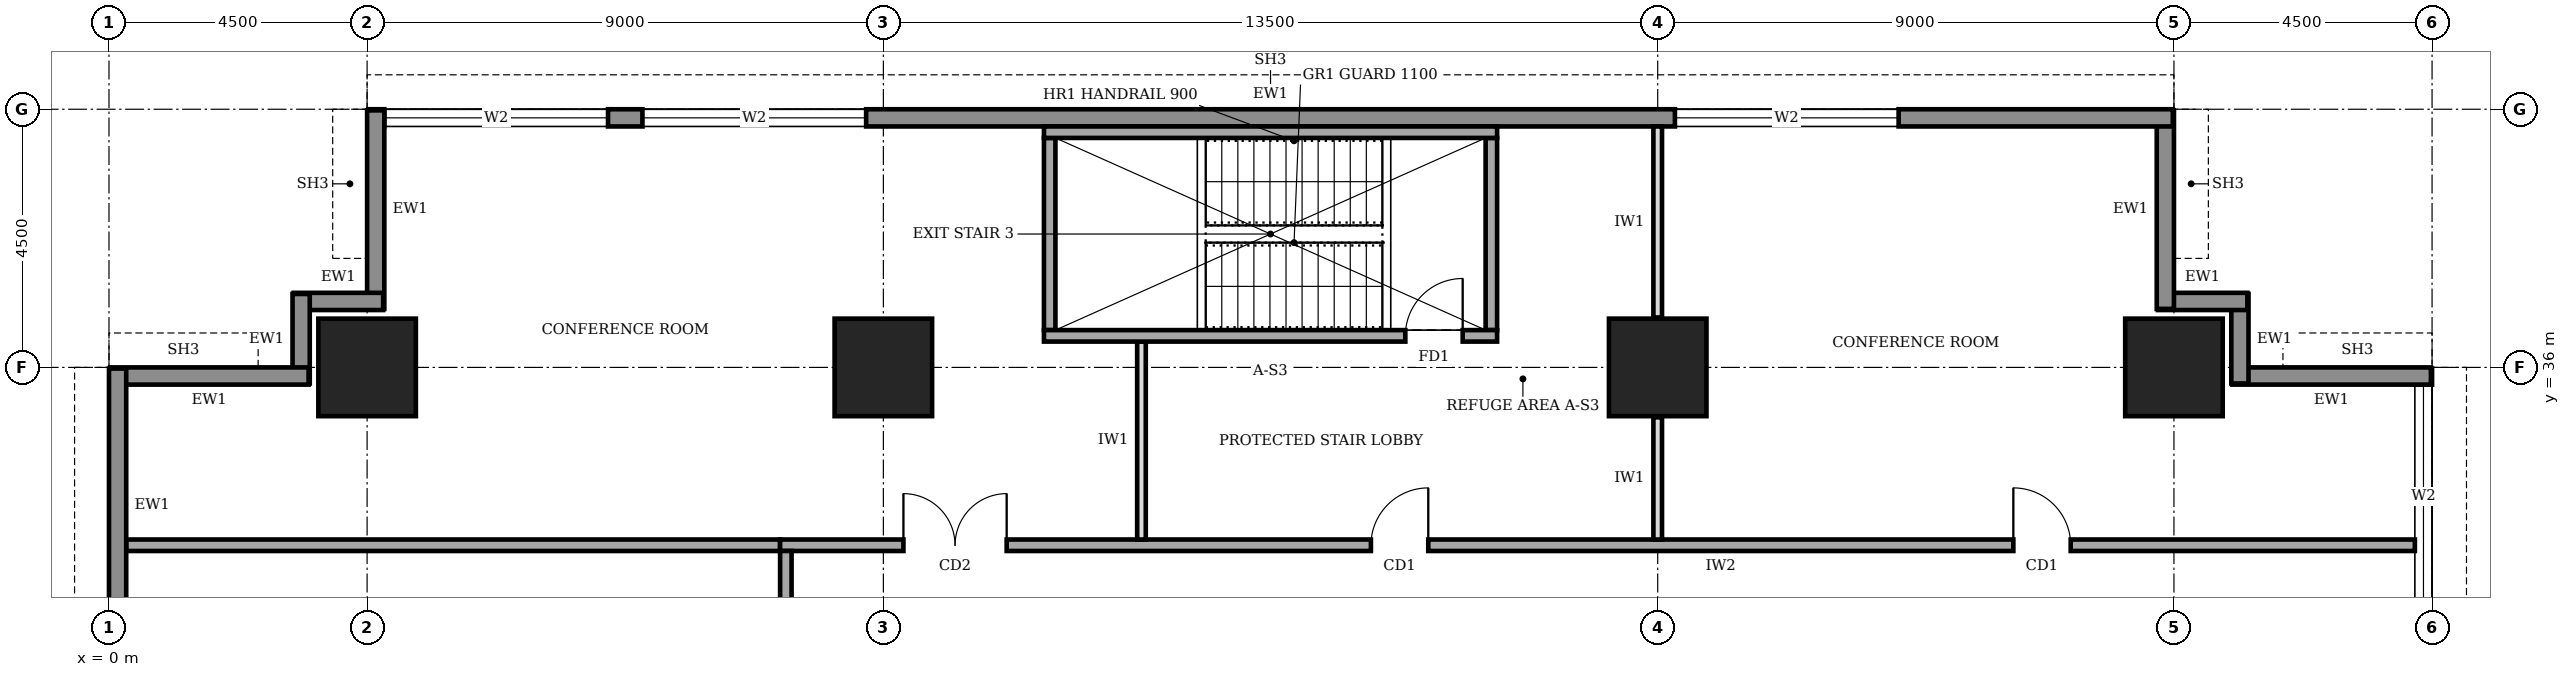
"""IFC4 building model, lengths in metres.
Left out: names, types, materials, properties, quantities, classifications, styles, units other than length and angle.
Written with IfcOpenShell. Run it as: python <this file> out.ifc"""

import sys

from ifc_helpers import new_model, si_unit, direction, frame, frame_2d, origin, origin_2d, place, context, subcontext, project, spatial, rectangle, extrude, element, fill, save


model = new_model("IFC4")
c1 = context("Model", 3, precision=1e-05, world=origin(), true_north=direction((0.0, 1.0)))
c2 = subcontext(c1, "Body", "Model", "MODEL_VIEW")
j1 = project(units=[si_unit("LENGTHUNIT", "METRE"), si_unit("PLANEANGLEUNIT", "RADIAN")], contexts=[c1])
p1 = place(None, origin())
s1 = spatial("IfcSite", under=j1, at=p1, CompositionType="ELEMENT")
p2 = place(p1, origin())
s2 = spatial("IfcBuilding", under=s1, at=p2, CompositionType="ELEMENT")
p3 = place(p2, frame((0.0, 0.0, 153.0)))
s3 = spatial("IfcBuildingStorey", under=s2, at=p3, CompositionType="ELEMENT", Elevation=153.0)
for number, where, z_axis, x_axis in (
    (1, (4.5, 36.0, 0.0), (0.0, 0.0, 1.0), (1.0, 0.0, 0.0)),
    (2, (13.5, 36.0, 0.0), (0.0, 0.0, 1.0), (1.0, 0.0, 0.0)),
    (3, (27.0, 36.0, 0.0), (0.0, 0.0, 1.0), (1.0, 0.0, 0.0)),
    (4, (36.0, 36.0, 0.0), (0.0, 0.0, 1.0), (1.0, 0.0, 0.0)),
):
    element("IfcColumn", number, at=place(p3, frame(where, z_axis=z_axis, x_axis=x_axis)), inside=s3, PredefinedType="COLUMN", context=c2, shape_type="SweptSolid", body=[
        extrude(rectangle(XDim=1.7, YDim=1.7, at=origin_2d()), origin(), (0.0, 0.0, 1.0), 4.0),
    ])
p4 = place(p3, frame((40.35, 4.52, 0.0), z_axis=(0.0, 0.0, 1.0), x_axis=(0.0, 1.0, 0.0)))
e5 = element("IfcWall", 5, at=p4, inside=s3, PredefinedType="STANDARD", context=c2, shape_type="SweptSolid", body=[
    extrude(rectangle(XDim=31.46, YDim=0.3, at=frame_2d((15.73, 0.0))), origin(), (0.0, 0.0, 1.0), 3.75),
])
p5 = place(p4, frame((4.78, 0.0, 0.6)))
e6 = element("IfcOpeningElement", 6, at=p5, cuts=e5, PredefinedType="OPENING", context=c2, shape_type="SweptSolid", body=[
    extrude(rectangle(XDim=3.9, YDim=2.6, at=frame_2d((1.95, 1.3))), frame((0.0, 0.16, 0.0), z_axis=(0.0, -1.0, 0.0), x_axis=(1.0, 0.0, 0.0)), (0.0, 0.0, 1.0), 0.32),
])
p6 = place(p4, frame((9.28, 0.0, 0.6)))
e7 = element("IfcOpeningElement", 7, at=p6, cuts=e5, PredefinedType="OPENING", context=c2, shape_type="SweptSolid", body=[
    extrude(rectangle(XDim=3.9, YDim=2.6, at=frame_2d((1.95, 1.3))), frame((0.0, 0.16, 0.0), z_axis=(0.0, -1.0, 0.0), x_axis=(1.0, 0.0, 0.0)), (0.0, 0.0, 1.0), 0.32),
])
p7 = place(p4, frame((13.78, 0.0, 0.6)))
e8 = element("IfcOpeningElement", 8, at=p7, cuts=e5, PredefinedType="OPENING", context=c2, shape_type="SweptSolid", body=[
    extrude(rectangle(XDim=3.9, YDim=2.6, at=frame_2d((1.95, 1.3))), frame((0.0, 0.16, 0.0), z_axis=(0.0, -1.0, 0.0), x_axis=(1.0, 0.0, 0.0)), (0.0, 0.0, 1.0), 0.32),
])
p8 = place(p4, frame((18.28, 0.0, 0.6)))
e9 = element("IfcOpeningElement", 9, at=p8, cuts=e5, PredefinedType="OPENING", context=c2, shape_type="SweptSolid", body=[
    extrude(rectangle(XDim=3.9, YDim=2.6, at=frame_2d((1.95, 1.3))), frame((0.0, 0.16, 0.0), z_axis=(0.0, -1.0, 0.0), x_axis=(1.0, 0.0, 0.0)), (0.0, 0.0, 1.0), 0.32),
])
p9 = place(p4, frame((22.78, 0.0, 0.6)))
e10 = element("IfcOpeningElement", 10, at=p9, cuts=e5, PredefinedType="OPENING", context=c2, shape_type="SweptSolid", body=[
    extrude(rectangle(XDim=3.9, YDim=2.6, at=frame_2d((1.95, 1.3))), frame((0.0, 0.16, 0.0), z_axis=(0.0, -1.0, 0.0), x_axis=(1.0, 0.0, 0.0)), (0.0, 0.0, 1.0), 0.32),
])
p10 = place(p4, frame((27.28, 0.0, 0.6)))
e11 = element("IfcOpeningElement", 11, at=p10, cuts=e5, PredefinedType="OPENING", context=c2, shape_type="SweptSolid", body=[
    extrude(rectangle(XDim=3.9, YDim=2.6, at=frame_2d((1.95, 1.3))), frame((0.0, 0.16, 0.0), z_axis=(0.0, -1.0, 0.0), x_axis=(1.0, 0.0, 0.0)), (0.0, 0.0, 1.0), 0.32),
])
p11 = place(p3, frame((40.48, 35.85, 0.0), z_axis=(0.0, 0.0, 1.0), x_axis=(-1.0, 0.0, 0.0)))
e12 = element("IfcWall", 12, at=p11, inside=s3, PredefinedType="STANDARD", context=c2, shape_type="SweptSolid", body=[
    extrude(rectangle(XDim=3.46, YDim=0.3, at=frame_2d((1.73, 0.0))), origin(), (0.0, 0.0, 1.0), 2.85),
])
for number, where, z_axis, x_axis in (
    (13, (37.15, 35.72, 0.0), (0.0, 0.0, 1.0), (0.0, 1.0, 0.0)),
    (14, (37.28, 37.15, 0.0), (0.0, 0.0, 1.0), (-1.0, 0.0, 0.0)),
):
    element("IfcWall", number, at=place(p3, frame(where, z_axis=z_axis, x_axis=x_axis)), inside=s3, PredefinedType="STANDARD", context=c2, shape_type="SweptSolid", body=[
        extrude(rectangle(XDim=1.56, YDim=0.3, at=frame_2d((0.78, 0.0))), origin(), (0.0, 0.0, 1.0), 3.75),
    ])
p12 = place(p3, frame((35.85, 37.02, 0.0), z_axis=(0.0, 0.0, 1.0), x_axis=(0.0, 1.0, 0.0)))
e15 = element("IfcWall", 15, at=p12, inside=s3, PredefinedType="STANDARD", context=c2, shape_type="SweptSolid", body=[
    extrude(rectangle(XDim=3.46, YDim=0.3, at=frame_2d((1.73, 0.0))), origin(), (0.0, 0.0, 1.0), 2.85),
])
p13 = place(p3, frame((35.98, 40.35, 0.0), z_axis=(0.0, 0.0, 1.0), x_axis=(-1.0, 0.0, 0.0)))
e16 = element("IfcWall", 16, at=p13, inside=s3, PredefinedType="STANDARD", context=c2, shape_type="SweptSolid", body=[
    extrude(rectangle(XDim=31.46, YDim=0.3, at=frame_2d((15.73, 0.0))), origin(), (0.0, 0.0, 1.0), 3.75),
])
p14 = place(p13, frame((27.28, 0.0, 0.6)))
e17 = element("IfcOpeningElement", 17, at=p14, cuts=e16, PredefinedType="OPENING", context=c2, shape_type="SweptSolid", body=[
    extrude(rectangle(XDim=3.9, YDim=2.6, at=frame_2d((1.95, 1.3))), frame((0.0, 0.16, 0.0), z_axis=(0.0, -1.0, 0.0), x_axis=(1.0, 0.0, 0.0)), (0.0, 0.0, 1.0), 0.32),
])
p15 = place(p13, frame((22.78, 0.0, 0.6)))
e18 = element("IfcOpeningElement", 18, at=p15, cuts=e16, PredefinedType="OPENING", context=c2, shape_type="SweptSolid", body=[
    extrude(rectangle(XDim=3.9, YDim=2.6, at=frame_2d((1.95, 1.3))), frame((0.0, 0.16, 0.0), z_axis=(0.0, -1.0, 0.0), x_axis=(1.0, 0.0, 0.0)), (0.0, 0.0, 1.0), 0.32),
])
p16 = place(p13, frame((4.78, 0.0, 0.6)))
e19 = element("IfcOpeningElement", 19, at=p16, cuts=e16, PredefinedType="OPENING", context=c2, shape_type="SweptSolid", body=[
    extrude(rectangle(XDim=3.9, YDim=2.6, at=frame_2d((1.95, 1.3))), frame((0.0, 0.16, 0.0), z_axis=(0.0, -1.0, 0.0), x_axis=(1.0, 0.0, 0.0)), (0.0, 0.0, 1.0), 0.32),
])
p17 = place(p3, frame((4.65, 40.48, 0.0), z_axis=(0.0, 0.0, 1.0), x_axis=(0.0, -1.0, 0.0)))
e20 = element("IfcWall", 20, at=p17, inside=s3, PredefinedType="STANDARD", context=c2, shape_type="SweptSolid", body=[
    extrude(rectangle(XDim=3.46, YDim=0.3, at=frame_2d((1.73, 0.0))), origin(), (0.0, 0.0, 1.0), 2.85),
])
for number, where, z_axis, x_axis in (
    (21, (4.78, 37.15, 0.0), (0.0, 0.0, 1.0), (-1.0, 0.0, 0.0)),
    (22, (3.35, 37.28, 0.0), (0.0, 0.0, 1.0), (0.0, -1.0, 0.0)),
):
    element("IfcWall", number, at=place(p3, frame(where, z_axis=z_axis, x_axis=x_axis)), inside=s3, PredefinedType="STANDARD", context=c2, shape_type="SweptSolid", body=[
        extrude(rectangle(XDim=1.56, YDim=0.3, at=frame_2d((0.78, 0.0))), origin(), (0.0, 0.0, 1.0), 3.75),
    ])
p18 = place(p3, frame((3.48, 35.85, 0.0), z_axis=(0.0, 0.0, 1.0), x_axis=(-1.0, 0.0, 0.0)))
e23 = element("IfcWall", 23, at=p18, inside=s3, PredefinedType="STANDARD", context=c2, shape_type="SweptSolid", body=[
    extrude(rectangle(XDim=3.46, YDim=0.3, at=frame_2d((1.73, 0.0))), origin(), (0.0, 0.0, 1.0), 2.85),
])
p19 = place(p3, frame((0.15, 35.98, 0.0), z_axis=(0.0, 0.0, 1.0), x_axis=(0.0, -1.0, 0.0)))
e24 = element("IfcWall", 24, at=p19, inside=s3, PredefinedType="STANDARD", context=c2, shape_type="SweptSolid", body=[
    extrude(rectangle(XDim=31.46, YDim=0.3, at=frame_2d((15.73, 0.0))), origin(), (0.0, 0.0, 1.0), 3.75),
])
p20 = place(p19, frame((27.28, 0.0, 0.6)))
e25 = element("IfcOpeningElement", 25, at=p20, cuts=e24, PredefinedType="OPENING", context=c2, shape_type="SweptSolid", body=[
    extrude(rectangle(XDim=3.9, YDim=2.6, at=frame_2d((1.95, 1.3))), frame((0.0, 0.16, 0.0), z_axis=(0.0, -1.0, 0.0), x_axis=(1.0, 0.0, 0.0)), (0.0, 0.0, 1.0), 0.32),
])
p21 = place(p19, frame((22.78, 0.0, 0.6)))
e26 = element("IfcOpeningElement", 26, at=p21, cuts=e24, PredefinedType="OPENING", context=c2, shape_type="SweptSolid", body=[
    extrude(rectangle(XDim=3.9, YDim=2.6, at=frame_2d((1.95, 1.3))), frame((0.0, 0.16, 0.0), z_axis=(0.0, -1.0, 0.0), x_axis=(1.0, 0.0, 0.0)), (0.0, 0.0, 1.0), 0.32),
])
p22 = place(p19, frame((18.28, 0.0, 0.6)))
e27 = element("IfcOpeningElement", 27, at=p22, cuts=e24, PredefinedType="OPENING", context=c2, shape_type="SweptSolid", body=[
    extrude(rectangle(XDim=3.9, YDim=2.6, at=frame_2d((1.95, 1.3))), frame((0.0, 0.16, 0.0), z_axis=(0.0, -1.0, 0.0), x_axis=(1.0, 0.0, 0.0)), (0.0, 0.0, 1.0), 0.32),
])
p23 = place(p19, frame((13.78, 0.0, 0.6)))
e28 = element("IfcOpeningElement", 28, at=p23, cuts=e24, PredefinedType="OPENING", context=c2, shape_type="SweptSolid", body=[
    extrude(rectangle(XDim=3.9, YDim=2.6, at=frame_2d((1.95, 1.3))), frame((0.0, 0.16, 0.0), z_axis=(0.0, -1.0, 0.0), x_axis=(1.0, 0.0, 0.0)), (0.0, 0.0, 1.0), 0.32),
])
p24 = place(p19, frame((9.28, 0.0, 0.6)))
e29 = element("IfcOpeningElement", 29, at=p24, cuts=e24, PredefinedType="OPENING", context=c2, shape_type="SweptSolid", body=[
    extrude(rectangle(XDim=3.9, YDim=2.6, at=frame_2d((1.95, 1.3))), frame((0.0, 0.16, 0.0), z_axis=(0.0, -1.0, 0.0), x_axis=(1.0, 0.0, 0.0)), (0.0, 0.0, 1.0), 0.32),
])
p25 = place(p19, frame((4.78, 0.0, 0.6)))
e30 = element("IfcOpeningElement", 30, at=p25, cuts=e24, PredefinedType="OPENING", context=c2, shape_type="SweptSolid", body=[
    extrude(rectangle(XDim=3.9, YDim=2.6, at=frame_2d((1.95, 1.3))), frame((0.0, 0.16, 0.0), z_axis=(0.0, -1.0, 0.0), x_axis=(1.0, 0.0, 0.0)), (0.0, 0.0, 1.0), 0.32),
])
p26 = place(p3, frame((40.2, 32.9, 0.0), z_axis=(0.0, 0.0, 1.0), x_axis=(-1.0, 0.0, 0.0)))
e31 = element("IfcWall", 31, at=p26, inside=s3, PredefinedType="SOLIDWALL", context=c2, shape_type="SweptSolid", body=[
    extrude(rectangle(XDim=28.5, YDim=0.2, at=frame_2d((14.25, 0.0))), origin(), (0.0, 0.0, 1.0), 3.75),
])
p27 = place(p26, frame((24.55, 0.0, 0.0)))
e32 = element("IfcOpeningElement", 32, at=p27, cuts=e31, PredefinedType="OPENING", context=c2, shape_type="SweptSolid", body=[
    extrude(rectangle(XDim=1.8, YDim=2.1, at=frame_2d((0.9, 1.05))), frame((0.0, 0.11, 0.0), z_axis=(0.0, -1.0, 0.0), x_axis=(1.0, 0.0, 0.0)), (0.0, 0.0, 1.0), 0.22),
])
p28 = place(p26, frame((17.2, 0.0, 0.0)))
e33 = element("IfcOpeningElement", 33, at=p28, cuts=e31, PredefinedType="OPENING", context=c2, shape_type="SweptSolid", body=[
    extrude(rectangle(XDim=1.0, YDim=2.1, at=frame_2d((0.5, 1.05))), frame((0.0, 0.11, 0.0), z_axis=(0.0, -1.0, 0.0), x_axis=(1.0, 0.0, 0.0)), (0.0, 0.0, 1.0), 0.22),
])
p29 = place(p26, frame((6.0, 0.0, 0.0)))
e34 = element("IfcOpeningElement", 34, at=p29, cuts=e31, PredefinedType="OPENING", context=c2, shape_type="SweptSolid", body=[
    extrude(rectangle(XDim=1.0, YDim=2.1, at=frame_2d((0.5, 1.05))), frame((0.0, 0.11, 0.0), z_axis=(0.0, -1.0, 0.0), x_axis=(1.0, 0.0, 0.0)), (0.0, 0.0, 1.0), 0.22),
])
p30 = place(p3, frame((11.8, 32.8, 0.0), z_axis=(0.0, 0.0, 1.0), x_axis=(0.0, -1.0, 0.0)))
e35 = element("IfcWall", 35, at=p30, inside=s3, PredefinedType="SOLIDWALL", context=c2, shape_type="SweptSolid", body=[
    extrude(rectangle(XDim=25.3, YDim=0.2, at=frame_2d((12.65, 0.0))), origin(), (0.0, 0.0, 1.0), 3.75),
])
p31 = place(p30, frame((21.8, 0.0, 0.0)))
e36 = element("IfcOpeningElement", 36, at=p31, cuts=e35, PredefinedType="OPENING", context=c2, shape_type="SweptSolid", body=[
    extrude(rectangle(XDim=1.0, YDim=2.1, at=frame_2d((0.5, 1.05))), frame((0.0, 0.11, 0.0), z_axis=(0.0, -1.0, 0.0), x_axis=(1.0, 0.0, 0.0)), (0.0, 0.0, 1.0), 0.22),
])
p32 = place(p30, frame((17.15, 0.0, 0.0)))
e37 = element("IfcOpeningElement", 37, at=p32, cuts=e35, PredefinedType="OPENING", context=c2, shape_type="SweptSolid", body=[
    extrude(rectangle(XDim=0.9, YDim=2.1, at=frame_2d((0.45, 1.05))), frame((0.0, 0.11, 0.0), z_axis=(0.0, -1.0, 0.0), x_axis=(1.0, 0.0, 0.0)), (0.0, 0.0, 1.0), 0.22),
])
p33 = place(p30, frame((12.35, 0.0, 0.0)))
e38 = element("IfcOpeningElement", 38, at=p33, cuts=e35, PredefinedType="OPENING", context=c2, shape_type="SweptSolid", body=[
    extrude(rectangle(XDim=0.9, YDim=2.1, at=frame_2d((0.45, 1.05))), frame((0.0, 0.11, 0.0), z_axis=(0.0, -1.0, 0.0), x_axis=(1.0, 0.0, 0.0)), (0.0, 0.0, 1.0), 0.22),
])
p34 = place(p30, frame((9.3, 0.0, 0.0)))
e39 = element("IfcOpeningElement", 39, at=p34, cuts=e35, PredefinedType="OPENING", context=c2, shape_type="SweptSolid", body=[
    extrude(rectangle(XDim=0.9, YDim=2.1, at=frame_2d((0.45, 1.05))), frame((0.0, 0.11, 0.0), z_axis=(0.0, -1.0, 0.0), x_axis=(1.0, 0.0, 0.0)), (0.0, 0.0, 1.0), 0.22),
])
p35 = place(p30, frame((6.3, 0.0, 0.0)))
e40 = element("IfcOpeningElement", 40, at=p35, cuts=e35, PredefinedType="OPENING", context=c2, shape_type="SweptSolid", body=[
    extrude(rectangle(XDim=1.0, YDim=2.1, at=frame_2d((0.5, 1.05))), frame((0.0, 0.11, 0.0), z_axis=(0.0, -1.0, 0.0), x_axis=(1.0, 0.0, 0.0)), (0.0, 0.0, 1.0), 0.22),
])
p36 = place(p30, frame((14.4, 0.0, 0.0)))
e41 = element("IfcOpeningElement", 41, at=p36, cuts=e35, PredefinedType="OPENING", context=c2, shape_type="SweptSolid", body=[
    extrude(rectangle(XDim=1.0, YDim=2.1, at=frame_2d((0.5, 1.05))), frame((0.0, 0.11, 0.0), z_axis=(0.0, -1.0, 0.0), x_axis=(1.0, 0.0, 0.0)), (0.0, 0.0, 1.0), 0.22),
])
p37 = place(p30, frame((2.3, 0.0, 0.0)))
e42 = element("IfcOpeningElement", 42, at=p37, cuts=e35, PredefinedType="OPENING", context=c2, shape_type="SweptSolid", body=[
    extrude(rectangle(XDim=1.0, YDim=2.1, at=frame_2d((0.5, 1.05))), frame((0.0, 0.11, 0.0), z_axis=(0.0, -1.0, 0.0), x_axis=(1.0, 0.0, 0.0)), (0.0, 0.0, 1.0), 0.22),
])
p38 = place(p3, frame((0.3, 32.9, 0.0), z_axis=(0.0, 0.0, 1.0), x_axis=(1.0, 0.0, 0.0)))
e43 = element("IfcWall", 43, at=p38, inside=s3, PredefinedType="SOLIDWALL", context=c2, shape_type="SweptSolid", body=[
    extrude(rectangle(XDim=11.4, YDim=0.2, at=frame_2d((5.7, 0.0))), origin(), (0.0, 0.0, 1.0), 3.75),
])
p39 = place(p3, frame((18.0, 33.0, 0.0), z_axis=(0.0, 0.0, 1.0), x_axis=(0.0, 1.0, 0.0)))
e44 = element("IfcWall", 44, at=p39, inside=s3, PredefinedType="PARTITIONING", context=c2, shape_type="SweptSolid", body=[
    extrude(rectangle(XDim=3.45, YDim=0.15, at=frame_2d((1.725, 0.0))), origin(), (0.0, 0.0, 1.0), 3.75),
])
p40 = place(p3, frame((27.0, 33.0, 0.0), z_axis=(0.0, 0.0, 1.0), x_axis=(0.0, 1.0, 0.0)))
e45 = element("IfcWall", 45, at=p40, inside=s3, PredefinedType="PARTITIONING", context=c2, shape_type="SweptSolid", body=[
    extrude(rectangle(XDim=2.13, YDim=0.15, at=frame_2d((1.065, 0.0))), origin(), (0.0, 0.0, 1.0), 2.85),
])
p41 = place(p3, frame((27.0, 36.87, 0.0), z_axis=(0.0, 0.0, 1.0), x_axis=(0.0, 1.0, 0.0)))
e46 = element("IfcWall", 46, at=p41, inside=s3, PredefinedType="PARTITIONING", context=c2, shape_type="SweptSolid", body=[
    extrude(rectangle(XDim=3.33, YDim=0.15, at=frame_2d((1.665, 0.0))), origin(), (0.0, 0.0, 1.0), 2.85),
])
p42 = place(p3, frame((16.3, 36.55, 0.0), z_axis=(0.0, 0.0, 1.0), x_axis=(1.0, 0.0, 0.0)))
e47 = element("IfcWall", 47, at=p42, inside=s3, PredefinedType="SOLIDWALL", context=c2, shape_type="SweptSolid", body=[
    extrude(rectangle(XDim=7.9, YDim=0.2, at=frame_2d((3.95, 0.0))), origin(), (0.0, 0.0, 1.0), 3.75),
])
p43 = place(p42, frame((6.3, 0.0, 0.0)))
e48 = element("IfcOpeningElement", 48, at=p43, cuts=e47, PredefinedType="OPENING", context=c2, shape_type="SweptSolid", body=[
    extrude(rectangle(XDim=1.0, YDim=2.1, at=frame_2d((0.5, 1.05))), frame((0.0, 0.11, 0.0), z_axis=(0.0, -1.0, 0.0), x_axis=(1.0, 0.0, 0.0)), (0.0, 0.0, 1.0), 0.22),
])
p44 = place(p3, frame((16.3, 40.1, 0.0), z_axis=(0.0, 0.0, 1.0), x_axis=(1.0, 0.0, 0.0)))
e49 = element("IfcWall", 49, at=p44, inside=s3, PredefinedType="SOLIDWALL", context=c2, shape_type="SweptSolid", body=[
    extrude(rectangle(XDim=7.9, YDim=0.2, at=frame_2d((3.95, 0.0))), origin(), (0.0, 0.0, 1.0), 3.75),
])
for number, where, z_axis, x_axis in (
    (50, (16.4, 36.65, 0.0), (0.0, 0.0, 1.0), (0.0, 1.0, 0.0)),
    (51, (24.1, 36.65, 0.0), (0.0, 0.0, 1.0), (0.0, 1.0, 0.0)),
):
    element("IfcWall", number, at=place(p3, frame(where, z_axis=z_axis, x_axis=x_axis)), inside=s3, PredefinedType="SOLIDWALL", context=c2, shape_type="SweptSolid", body=[
        extrude(rectangle(XDim=3.35, YDim=0.2, at=frame_2d((1.675, 0.0))), origin(), (0.0, 0.0, 1.0), 3.75),
    ])
p45 = place(p10, origin())
e52 = element("IfcWindow", 52, at=p45, inside=s3, PartitioningType="SINGLE_PANEL", PredefinedType="WINDOW", context=c2, shape_type="SweptSolid", body=[
    extrude(rectangle(XDim=3.9, YDim=2.6, at=frame_2d((1.95, 1.3))), frame((0.0, 0.03, 0.0), z_axis=(0.0, -1.0, 0.0), x_axis=(1.0, 0.0, 0.0)), (0.0, 0.0, 1.0), 0.06),
])
fill(e11, e52)
p46 = place(p14, origin())
e53 = element("IfcWindow", 53, at=p46, inside=s3, PartitioningType="SINGLE_PANEL", PredefinedType="WINDOW", context=c2, shape_type="SweptSolid", body=[
    extrude(rectangle(XDim=3.9, YDim=2.6, at=frame_2d((1.95, 1.3))), frame((0.0, 0.03, 0.0), z_axis=(0.0, -1.0, 0.0), x_axis=(1.0, 0.0, 0.0)), (0.0, 0.0, 1.0), 0.06),
])
fill(e17, e53)
p47 = place(p15, origin())
e54 = element("IfcWindow", 54, at=p47, inside=s3, PartitioningType="SINGLE_PANEL", PredefinedType="WINDOW", context=c2, shape_type="SweptSolid", body=[
    extrude(rectangle(XDim=3.9, YDim=2.6, at=frame_2d((1.95, 1.3))), frame((0.0, 0.03, 0.0), z_axis=(0.0, -1.0, 0.0), x_axis=(1.0, 0.0, 0.0)), (0.0, 0.0, 1.0), 0.06),
])
fill(e18, e54)
p48 = place(p16, origin())
e55 = element("IfcWindow", 55, at=p48, inside=s3, PartitioningType="SINGLE_PANEL", PredefinedType="WINDOW", context=c2, shape_type="SweptSolid", body=[
    extrude(rectangle(XDim=3.9, YDim=2.6, at=frame_2d((1.95, 1.3))), frame((0.0, 0.03, 0.0), z_axis=(0.0, -1.0, 0.0), x_axis=(1.0, 0.0, 0.0)), (0.0, 0.0, 1.0), 0.06),
])
fill(e19, e55)
p49 = place(p27, frame((1.8, 0.0, 0.0), z_axis=(0.0, 0.0, 1.0), x_axis=(-1.0, 0.0, 0.0)))
e56 = element("IfcDoor", 56, at=p49, inside=s3, OperationType="DOUBLE_DOOR_SINGLE_SWING", PredefinedType="DOOR", context=c2, shape_type="SweptSolid", body=[
    extrude(rectangle(XDim=1.8, YDim=2.1, at=frame_2d((0.9, 1.05))), frame((0.0, 0.025, 0.0), z_axis=(0.0, -1.0, 0.0), x_axis=(1.0, 0.0, 0.0)), (0.0, 0.0, 1.0), 0.05),
])
fill(e32, e56)
p50 = place(p28, frame((1.0, 0.0, 0.0), z_axis=(0.0, 0.0, 1.0), x_axis=(-1.0, 0.0, 0.0)))
e57 = element("IfcDoor", 57, at=p50, inside=s3, OperationType="SINGLE_SWING_RIGHT", PredefinedType="DOOR", context=c2, shape_type="SweptSolid", body=[
    extrude(rectangle(XDim=1.0, YDim=2.1, at=frame_2d((0.5, 1.05))), frame((0.0, 0.025, 0.0), z_axis=(0.0, -1.0, 0.0), x_axis=(1.0, 0.0, 0.0)), (0.0, 0.0, 1.0), 0.05),
])
fill(e33, e57)
p51 = place(p29, frame((1.0, 0.0, 0.0), z_axis=(0.0, 0.0, 1.0), x_axis=(-1.0, 0.0, 0.0)))
e58 = element("IfcDoor", 58, at=p51, inside=s3, OperationType="SINGLE_SWING_LEFT", PredefinedType="DOOR", context=c2, shape_type="SweptSolid", body=[
    extrude(rectangle(XDim=1.0, YDim=2.1, at=frame_2d((0.5, 1.05))), frame((0.0, 0.025, 0.0), z_axis=(0.0, -1.0, 0.0), x_axis=(1.0, 0.0, 0.0)), (0.0, 0.0, 1.0), 0.05),
])
fill(e34, e58)
p52 = place(p43, origin())
e59 = element("IfcDoor", 59, at=p52, inside=s3, OperationType="SINGLE_SWING_RIGHT", PredefinedType="DOOR", context=c2, shape_type="SweptSolid", body=[
    extrude(rectangle(XDim=1.0, YDim=2.1, at=frame_2d((0.5, 1.05))), frame((0.0, 0.025, 0.0), z_axis=(0.0, -1.0, 0.0), x_axis=(1.0, 0.0, 0.0)), (0.0, 0.0, 1.0), 0.05),
])
fill(e48, e59)
save(model, sys.argv[1])
